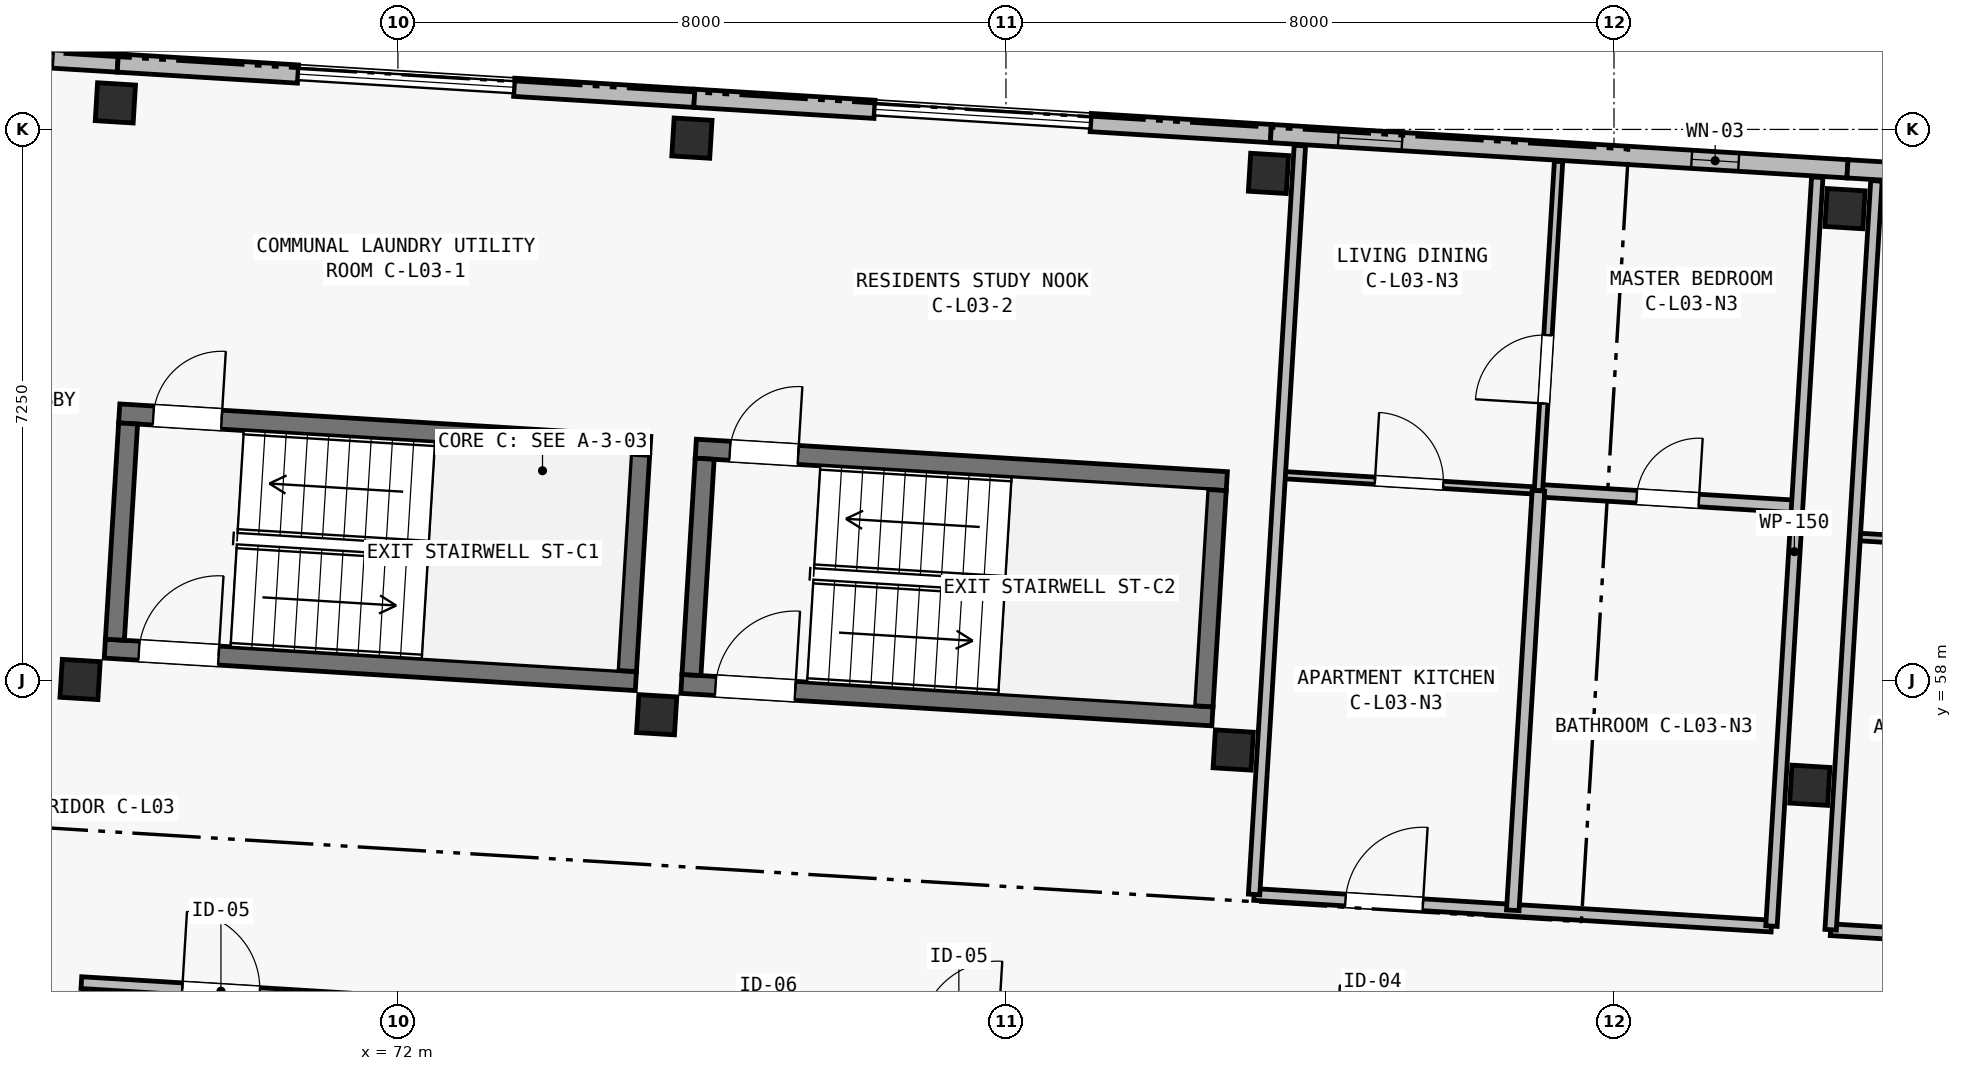
"""IFC4 building model, lengths in metres.
Left out: names, types, materials, properties, quantities, classifications, styles, units other than length and angle.
Written with IfcOpenShell. Run it as: python <this file> out.ifc"""

import sys

from ifc_helpers import new_model, si_unit, direction, frame, frame_2d, origin, origin_2d, place, context, subcontext, project, spatial, rectangle, extrude, element, fill, save


model = new_model("IFC4")
c1 = context("Model", 3, precision=1e-05, world=origin(), true_north=direction((0.0, 1.0)))
c2 = subcontext(c1, "Body", "Model", "MODEL_VIEW")
j1 = project(units=[si_unit("LENGTHUNIT", "METRE"), si_unit("PLANEANGLEUNIT", "RADIAN")], contexts=[c1])
p1 = place(None, origin())
s1 = spatial("IfcSite", under=j1, at=p1, CompositionType="ELEMENT")
p2 = place(p1, origin())
s2 = spatial("IfcBuilding", under=s1, at=p2, CompositionType="ELEMENT")
p3 = place(p2, frame((0.0, 0.0, 11.65)))
s3 = spatial("IfcBuildingStorey", under=s2, at=p3, CompositionType="ELEMENT", Elevation=11.65)
for number, where, z_axis, x_axis in (
    (1, (67.818, 58.014, 0.0), (0.0, 0.0, 1.0), (0.998, -0.061, 0.0)),
    (2, (68.282, 65.599, 0.0), (0.0, 0.0, 1.0), (0.998, -0.061, 0.0)),
    (3, (75.404, 57.55, 0.0), (0.0, 0.0, 1.0), (0.998, -0.061, 0.0)),
    (4, (75.868, 65.135, 0.0), (0.0, 0.0, 1.0), (0.998, -0.061, 0.0)),
    (5, (82.99, 57.086, 0.0), (0.0, 0.0, 1.0), (0.998, -0.061, 0.0)),
    (6, (83.454, 64.672, 0.0), (0.0, 0.0, 1.0), (0.998, -0.061, 0.0)),
    (7, (90.576, 56.622, 0.0), (0.0, 0.0, 1.0), (0.998, -0.061, 0.0)),
    (8, (91.04, 64.208, 0.0), (0.0, 0.0, 1.0), (0.998, -0.061, 0.0)),
):
    element("IfcColumn", number, at=place(p3, frame(where, z_axis=z_axis, x_axis=x_axis)), inside=s3, PredefinedType="COLUMN", context=c2, shape_type="SweptSolid", body=[
        extrude(rectangle(XDim=0.5, YDim=0.5, at=origin_2d()), origin(), (0.0, 0.0, 1.0), 3.25),
    ])
p4 = place(p3, frame((68.333, 61.514, 0.0), z_axis=(0.0, 0.0, 1.0), x_axis=(0.998135676081, -0.061034188237, 0.0)))
e9 = element("IfcWall", 9, at=p4, inside=s3, PredefinedType="SHEAR", context=c2, shape_type="SweptSolid", body=[
    extrude(rectangle(XDim=7.0, YDim=0.25, at=frame_2d((3.5, 0.0))), origin(), (0.0, 0.0, 1.0), 3.25),
])
p5 = place(p4, frame((0.45, 0.0, 0.0)))
e10 = element("IfcOpeningElement", 10, at=p5, cuts=e9, PredefinedType="OPENING", context=c2, shape_type="SweptSolid", body=[
    extrude(rectangle(XDim=0.9, YDim=2.1, at=frame_2d((0.45, 1.05))), frame((0.0, 0.14, 0.0), z_axis=(0.0, -1.0, 0.0), x_axis=(1.0, 0.0, 0.0)), (0.0, 0.0, 1.0), 0.28),
])
p6 = place(p3, frame((68.144, 58.419, 0.0), z_axis=(0.0, 0.0, 1.0), x_axis=(0.998135546153, -0.061036313012, 0.0)))
e11 = element("IfcWall", 11, at=p6, inside=s3, PredefinedType="SHEAR", context=c2, shape_type="SweptSolid", body=[
    extrude(rectangle(XDim=7.0, YDim=0.25, at=frame_2d((3.5, 0.0))), origin(), (0.0, 0.0, 1.0), 3.25),
])
p7 = place(p6, frame((0.45, 0.0, 0.0)))
e12 = element("IfcOpeningElement", 12, at=p7, cuts=e11, PredefinedType="OPENING", context=c2, shape_type="SweptSolid", body=[
    extrude(rectangle(XDim=1.05, YDim=2.15, at=frame_2d((0.525, 1.075))), frame((0.0, 0.14, 0.0), z_axis=(0.0, -1.0, 0.0), x_axis=(1.0, 0.0, 0.0)), (0.0, 0.0, 1.0), 0.28),
])
for number, where, z_axis, x_axis in (
    (13, (68.276, 58.537, 0.0), (0.0, 0.0, 1.0), (0.061, 0.998, 0.0)),
    (14, (75.014, 58.125, 0.0), (0.0, 0.0, 1.0), (0.061, 0.998, 0.0)),
):
    element("IfcWall", number, at=place(p3, frame(where, z_axis=z_axis, x_axis=x_axis)), inside=s3, PredefinedType="SHEAR", context=c2, shape_type="SweptSolid", body=[
        extrude(rectangle(XDim=2.85, YDim=0.25, at=frame_2d((1.425, 0.0))), origin(), (0.0, 0.0, 1.0), 3.25),
    ])
p8 = place(p3, frame((75.919, 61.05, 0.0), z_axis=(0.0, 0.0, 1.0), x_axis=(0.998135546153, -0.061036313012, 0.0)))
e15 = element("IfcWall", 15, at=p8, inside=s3, PredefinedType="SHEAR", context=c2, shape_type="SweptSolid", body=[
    extrude(rectangle(XDim=7.0, YDim=0.25, at=frame_2d((3.5, 0.0))), origin(), (0.0, 0.0, 1.0), 3.25),
])
p9 = place(p8, frame((0.45, 0.0, 0.0)))
e16 = element("IfcOpeningElement", 16, at=p9, cuts=e15, PredefinedType="OPENING", context=c2, shape_type="SweptSolid", body=[
    extrude(rectangle(XDim=0.9, YDim=2.1, at=frame_2d((0.45, 1.05))), frame((0.0, 0.14, 0.0), z_axis=(0.0, -1.0, 0.0), x_axis=(1.0, 0.0, 0.0)), (0.0, 0.0, 1.0), 0.28),
])
p10 = place(p3, frame((75.73, 57.956, 0.0), z_axis=(0.0, 0.0, 1.0), x_axis=(0.998135546153, -0.061036313012, 0.0)))
e17 = element("IfcWall", 17, at=p10, inside=s3, PredefinedType="SHEAR", context=c2, shape_type="SweptSolid", body=[
    extrude(rectangle(XDim=7.0, YDim=0.25, at=frame_2d((3.5, 0.0))), origin(), (0.0, 0.0, 1.0), 3.25),
])
p11 = place(p10, frame((0.45, 0.0, 0.0)))
e18 = element("IfcOpeningElement", 18, at=p11, cuts=e17, PredefinedType="OPENING", context=c2, shape_type="SweptSolid", body=[
    extrude(rectangle(XDim=1.05, YDim=2.15, at=frame_2d((0.525, 1.075))), frame((0.0, 0.14, 0.0), z_axis=(0.0, -1.0, 0.0), x_axis=(1.0, 0.0, 0.0)), (0.0, 0.0, 1.0), 0.28),
])
for number, where, z_axis, x_axis in (
    (19, (75.862, 58.073, 0.0), (0.0, 0.0, 1.0), (0.061, 0.998, 0.0)),
    (20, (82.599, 57.661, 0.0), (0.0, 0.0, 1.0), (0.061, 0.998, 0.0)),
):
    element("IfcWall", number, at=place(p3, frame(where, z_axis=z_axis, x_axis=x_axis)), inside=s3, PredefinedType="SHEAR", context=c2, shape_type="SweptSolid", body=[
        extrude(rectangle(XDim=2.85, YDim=0.25, at=frame_2d((1.425, 0.0))), origin(), (0.0, 0.0, 1.0), 3.25),
    ])
p12 = place(p3, frame((60.205, 66.62, 0.0), z_axis=(0.0, 0.0, 1.0), x_axis=(0.998134248939, -0.061057522844, 0.0)))
e21 = element("IfcWall", 21, at=p12, inside=s3, PredefinedType="SOLIDWALL", context=c2, shape_type="SweptSolid", body=[
    extrude(rectangle(XDim=8.125, YDim=0.24, at=frame_2d((4.062, 0.0))), origin(), (0.0, 0.0, 1.0), 3.0),
])
p13 = place(p12, frame((6.525, 0.0, 0.45)))
e22 = element("IfcOpeningElement", 22, at=p13, cuts=e21, PredefinedType="OPENING", context=c2, shape_type="SweptSolid", body=[
    extrude(rectangle(XDim=0.75, YDim=2.32, at=frame_2d((0.375, 1.16))), frame((0.0, 0.135, 0.0), z_axis=(0.0, -1.0, 0.0), x_axis=(1.0, 0.0, 0.0)), (0.0, 0.0, 1.0), 0.27),
])
p14 = place(p3, frame((68.314, 66.124, 0.0), z_axis=(0.0, 0.0, 1.0), x_axis=(0.998134103342, -0.061059902923, 0.0)))
e23 = element("IfcWall", 23, at=p14, inside=s3, PredefinedType="SOLIDWALL", context=c2, shape_type="SweptSolid", body=[
    extrude(rectangle(XDim=2.375, YDim=0.24, at=frame_2d((1.188, 0.0))), origin(), (0.0, 0.0, 1.0), 3.0),
])
p15 = place(p3, frame((73.53, 65.804, 0.0), z_axis=(0.0, 0.0, 1.0), x_axis=(0.998133720034, -0.061066168473, 0.0)))
e24 = element("IfcWall", 24, at=p15, inside=s3, PredefinedType="SOLIDWALL", context=c2, shape_type="SweptSolid", body=[
    extrude(rectangle(XDim=2.375, YDim=0.24, at=frame_2d((1.188, 0.0))), origin(), (0.0, 0.0, 1.0), 3.0),
])
for number, where, z_axis, x_axis in (
    (25, (75.9, 65.659, 0.0), (0.0, 0.0, 1.0), (0.998, -0.061, 0.0)),
    (26, (81.115, 65.341, 0.0), (0.0, 0.0, 1.0), (0.998, -0.061, 0.0)),
):
    element("IfcWall", number, at=place(p3, frame(where, z_axis=z_axis, x_axis=x_axis)), inside=s3, PredefinedType="SOLIDWALL", context=c2, shape_type="SweptSolid", body=[
        extrude(rectangle(XDim=2.375, YDim=0.24, at=frame_2d((1.188, 0.0))), origin(), (0.0, 0.0, 1.0), 3.0),
    ])
p16 = place(p3, frame((83.486, 65.196, 0.0), z_axis=(0.0, 0.0, 1.0), x_axis=(0.998135669243, -0.061034300063, 0.0)))
e27 = element("IfcWall", 27, at=p16, inside=s3, PredefinedType="SOLIDWALL", context=c2, shape_type="SweptSolid", body=[
    extrude(rectangle(XDim=7.6, YDim=0.24, at=frame_2d((3.8, 0.0))), origin(), (0.0, 0.0, 1.0), 3.0),
])
p17 = place(p16, frame((0.89, 0.0, 0.44)))
e28 = element("IfcOpeningElement", 28, at=p17, cuts=e27, PredefinedType="OPENING", context=c2, shape_type="SweptSolid", body=[
    extrude(rectangle(XDim=0.84, YDim=2.28, at=frame_2d((0.42, 1.14))), frame((0.0, 0.135, 0.0), z_axis=(0.0, -1.0, 0.0), x_axis=(1.0, 0.0, 0.0)), (0.0, 0.0, 1.0), 0.27),
])
p18 = place(p16, frame((5.546, 0.0, 0.5)))
e29 = element("IfcOpeningElement", 29, at=p18, cuts=e27, PredefinedType="OPENING", context=c2, shape_type="SweptSolid", body=[
    extrude(rectangle(XDim=0.62, YDim=2.28, at=frame_2d((0.31, 1.14))), frame((0.0, 0.135, 0.0), z_axis=(0.0, -1.0, 0.0), x_axis=(1.0, 0.0, 0.0)), (0.0, 0.0, 1.0), 0.27),
])
p19 = place(p3, frame((91.072, 64.732, 0.0), z_axis=(0.0, 0.0, 1.0), x_axis=(0.998133591969, -0.061068261669, 0.0)))
e30 = element("IfcWall", 30, at=p19, inside=s3, PredefinedType="SOLIDWALL", context=c2, shape_type="SweptSolid", body=[
    extrude(rectangle(XDim=7.6, YDim=0.24, at=frame_2d((3.8, 0.0))), origin(), (0.0, 0.0, 1.0), 3.0),
])
p20 = place(p19, frame((1.854, 0.0, 0.5)))
e31 = element("IfcOpeningElement", 31, at=p20, cuts=e30, PredefinedType="OPENING", context=c2, shape_type="SweptSolid", body=[
    extrude(rectangle(XDim=0.68, YDim=2.24, at=frame_2d((0.34, 1.12))), frame((0.0, 0.135, 0.0), z_axis=(0.0, -1.0, 0.0), x_axis=(1.0, 0.0, 0.0)), (0.0, 0.0, 1.0), 0.27),
])
p21 = place(p19, frame((5.018, 0.0, 0.44)))
e32 = element("IfcOpeningElement", 32, at=p21, cuts=e30, PredefinedType="OPENING", context=c2, shape_type="SweptSolid", body=[
    extrude(rectangle(XDim=0.76, YDim=2.34, at=frame_2d((0.38, 1.17))), frame((0.0, 0.135, 0.0), z_axis=(0.0, -1.0, 0.0), x_axis=(1.0, 0.0, 0.0)), (0.0, 0.0, 1.0), 0.27),
])
p22 = place(p3, frame((67.835, 54.025, 0.0), z_axis=(0.0, 0.0, 1.0), x_axis=(0.998135666539, -0.061034344288, 0.0)))
e33 = element("IfcWall", 33, at=p22, inside=s3, PredefinedType="PARTITIONING", context=c2, shape_type="SweptSolid", body=[
    extrude(rectangle(XDim=7.08, YDim=0.155, at=frame_2d((3.54, 0.0))), origin(), (0.0, 0.0, 1.0), 2.97),
])
p23 = place(p22, frame((1.33, 0.0, 0.0)))
e34 = element("IfcOpeningElement", 34, at=p23, cuts=e33, PredefinedType="OPENING", context=c2, shape_type="SweptSolid", body=[
    extrude(rectangle(XDim=1.02, YDim=2.2, at=frame_2d((0.51, 1.1))), frame((0.0, 0.093, 0.0), z_axis=(0.0, -1.0, 0.0), x_axis=(1.0, 0.0, 0.0)), (0.0, 0.0, 1.0), 0.185),
])
p24 = place(p3, frame((83.265, 55.185, 0.0), z_axis=(0.0, 0.0, 1.0), x_axis=(0.998135531673, -0.061036549799, 0.0)))
e35 = element("IfcWall", 35, at=p24, inside=s3, PredefinedType="PARTITIONING", context=c2, shape_type="SweptSolid", body=[
    extrude(rectangle(XDim=6.82, YDim=0.155, at=frame_2d((3.41, 0.0))), origin(), (0.0, 0.0, 1.0), 2.97),
])
p25 = place(p24, frame((1.205, 0.0, 0.0)))
e36 = element("IfcOpeningElement", 36, at=p25, cuts=e35, PredefinedType="OPENING", context=c2, shape_type="SweptSolid", body=[
    extrude(rectangle(XDim=1.02, YDim=2.2, at=frame_2d((0.51, 1.1))), frame((0.0, 0.093, 0.0), z_axis=(0.0, -1.0, 0.0), x_axis=(1.0, 0.0, 0.0)), (0.0, 0.0, 1.0), 0.185),
])
p26 = place(p3, frame((83.602, 60.705, 0.0), z_axis=(0.0, 0.0, 1.0), x_axis=(0.998133617109, -0.061067850767, 0.0)))
e37 = element("IfcWall", 37, at=p26, inside=s3, PredefinedType="PARTITIONING", context=c2, shape_type="SweptSolid", body=[
    extrude(rectangle(XDim=3.41, YDim=0.095, at=frame_2d((1.705, 0.0))), origin(), (0.0, 0.0, 1.0), 2.97),
])
p27 = place(p26, frame((1.255, 0.0, 0.0)))
e38 = element("IfcOpeningElement", 38, at=p27, cuts=e37, PredefinedType="OPENING", context=c2, shape_type="SweptSolid", body=[
    extrude(rectangle(XDim=0.9, YDim=2.1, at=frame_2d((0.45, 1.05))), frame((0.0, 0.062, 0.0), z_axis=(0.0, -1.0, 0.0), x_axis=(1.0, 0.0, 0.0)), (0.0, 0.0, 1.0), 0.125),
])
p28 = place(p3, frame((87.006, 60.497, 0.0), z_axis=(0.0, 0.0, 1.0), x_axis=(0.998137711988, -0.061000884486, 0.0)))
e39 = element("IfcWall", 39, at=p28, inside=s3, PredefinedType="PLUMBINGWALL", context=c2, shape_type="SweptSolid", body=[
    extrude(rectangle(XDim=3.41, YDim=0.165, at=frame_2d((1.705, 0.0))), origin(), (0.0, 0.0, 1.0), 2.97),
])
p29 = place(p28, frame((1.295, 0.0, 0.0)))
e40 = element("IfcOpeningElement", 40, at=p29, cuts=e39, PredefinedType="OPENING", context=c2, shape_type="SweptSolid", body=[
    extrude(rectangle(XDim=0.82, YDim=2.08, at=frame_2d((0.41, 1.04))), frame((0.0, 0.097, 0.0), z_axis=(0.0, -1.0, 0.0), x_axis=(1.0, 0.0, 0.0)), (0.0, 0.0, 1.0), 0.195),
])
p30 = place(p3, frame((87.006, 60.497, 0.0), z_axis=(0.0, 0.0, 1.0), x_axis=(0.06103343432, 0.998135722182, 0.0)))
e41 = element("IfcWall", 41, at=p30, inside=s3, PredefinedType="PARTITIONING", context=c2, shape_type="SweptSolid", body=[
    extrude(rectangle(XDim=4.34, YDim=0.11, at=frame_2d((2.17, 0.0))), origin(), (0.0, 0.0, 1.0), 2.97),
])
p31 = place(p30, frame((1.15, 0.0, 0.0)))
e42 = element("IfcOpeningElement", 42, at=p31, cuts=e41, PredefinedType="OPENING", context=c2, shape_type="SweptSolid", body=[
    extrude(rectangle(XDim=0.9, YDim=2.1, at=frame_2d((0.45, 1.05))), frame((0.0, 0.07, 0.0), z_axis=(0.0, -1.0, 0.0), x_axis=(1.0, 0.0, 0.0)), (0.0, 0.0, 1.0), 0.14),
])
p32 = place(p3, frame((86.668, 54.977, 0.0), z_axis=(0.0, 0.0, 1.0), x_axis=(0.061058897293, 0.99813416486, 0.0)))
e43 = element("IfcWall", 43, at=p32, inside=s3, PredefinedType="PLUMBINGWALL", context=c2, shape_type="SweptSolid", body=[
    extrude(rectangle(XDim=5.53, YDim=0.165, at=frame_2d((2.765, 0.0))), origin(), (0.0, 0.0, 1.0), 2.97),
])
p33 = place(p3, frame((83.265, 55.185, 0.0), z_axis=(0.0, 0.0, 1.0), x_axis=(0.061046193261, 0.998134941923, 0.0)))
e44 = element("IfcWall", 44, at=p33, inside=s3, PredefinedType="PARTITIONING", context=c2, shape_type="SweptSolid", body=[
    extrude(rectangle(XDim=9.87, YDim=0.15, at=frame_2d((4.935, 0.0))), origin(), (0.0, 0.0, 1.0), 2.97),
])
p34 = place(p3, frame((90.072, 54.769, 0.0), z_axis=(0.0, 0.0, 1.0), x_axis=(0.061047700465, 0.998134849741, 0.0)))
e45 = element("IfcWall", 45, at=p34, inside=s3, PredefinedType="PARTITIONING", context=c2, shape_type="SweptSolid", body=[
    extrude(rectangle(XDim=9.87, YDim=0.15, at=frame_2d((4.935, 0.0))), origin(), (0.0, 0.0, 1.0), 2.97),
])
p35 = place(p3, frame((90.85, 54.721, 0.0), z_axis=(0.0, 0.0, 1.0), x_axis=(0.998135665032, -0.06103436893, 0.0)))
e46 = element("IfcWall", 46, at=p35, inside=s3, PredefinedType="PARTITIONING", context=c2, shape_type="SweptSolid", body=[
    extrude(rectangle(XDim=6.82, YDim=0.155, at=frame_2d((3.41, 0.0))), origin(), (0.0, 0.0, 1.0), 2.97),
])
p36 = place(p35, frame((1.205, 0.0, 0.0)))
e47 = element("IfcOpeningElement", 47, at=p36, cuts=e46, PredefinedType="OPENING", context=c2, shape_type="SweptSolid", body=[
    extrude(rectangle(XDim=0.98, YDim=2.15, at=frame_2d((0.49, 1.075))), frame((0.0, 0.093, 0.0), z_axis=(0.0, -1.0, 0.0), x_axis=(1.0, 0.0, 0.0)), (0.0, 0.0, 1.0), 0.185),
])
p37 = place(p3, frame((91.167, 59.892, 0.0), z_axis=(0.0, 0.0, 1.0), x_axis=(0.998133617109, -0.061067850767, 0.0)))
e48 = element("IfcWall", 48, at=p37, inside=s3, PredefinedType="PARTITIONING", context=c2, shape_type="SweptSolid", body=[
    extrude(rectangle(XDim=3.41, YDim=0.1, at=frame_2d((1.705, 0.0))), origin(), (0.0, 0.0, 1.0), 2.97),
])
p38 = place(p37, frame((1.255, 0.0, 0.0)))
e49 = element("IfcOpeningElement", 49, at=p38, cuts=e48, PredefinedType="OPENING", context=c2, shape_type="SweptSolid", body=[
    extrude(rectangle(XDim=0.88, YDim=2.1, at=frame_2d((0.44, 1.05))), frame((0.0, 0.065, 0.0), z_axis=(0.0, -1.0, 0.0), x_axis=(1.0, 0.0, 0.0)), (0.0, 0.0, 1.0), 0.13),
])
p39 = place(p3, frame((90.85, 54.721, 0.0), z_axis=(0.0, 0.0, 1.0), x_axis=(0.061047700465, 0.998134849741, 0.0)))
e50 = element("IfcWall", 50, at=p39, inside=s3, PredefinedType="PARTITIONING", context=c2, shape_type="SweptSolid", body=[
    extrude(rectangle(XDim=9.87, YDim=0.15, at=frame_2d((4.935, 0.0))), origin(), (0.0, 0.0, 1.0), 2.97),
])
p40 = place(p13, origin())
e51 = element("IfcWindow", 51, at=p40, inside=s3, PartitioningType="SINGLE_PANEL", PredefinedType="WINDOW", context=c2, shape_type="SweptSolid", body=[
    extrude(rectangle(XDim=0.75, YDim=2.32, at=frame_2d((0.375, 1.16))), frame((0.0, 0.03, 0.0), z_axis=(0.0, -1.0, 0.0), x_axis=(1.0, 0.0, 0.0)), (0.0, 0.0, 1.0), 0.06),
])
fill(e22, e51)
p41 = place(p17, origin())
e52 = element("IfcWindow", 52, at=p41, inside=s3, PartitioningType="SINGLE_PANEL", PredefinedType="WINDOW", context=c2, shape_type="SweptSolid", body=[
    extrude(rectangle(XDim=0.84, YDim=2.28, at=frame_2d((0.42, 1.14))), frame((0.0, 0.03, 0.0), z_axis=(0.0, -1.0, 0.0), x_axis=(1.0, 0.0, 0.0)), (0.0, 0.0, 1.0), 0.06),
])
fill(e28, e52)
p42 = place(p18, origin())
e53 = element("IfcWindow", 53, at=p42, inside=s3, PartitioningType="SINGLE_PANEL", PredefinedType="WINDOW", context=c2, shape_type="SweptSolid", body=[
    extrude(rectangle(XDim=0.62, YDim=2.28, at=frame_2d((0.31, 1.14))), frame((0.0, 0.03, 0.0), z_axis=(0.0, -1.0, 0.0), x_axis=(1.0, 0.0, 0.0)), (0.0, 0.0, 1.0), 0.06),
])
fill(e29, e53)
p43 = place(p23, origin())
e54 = element("IfcDoor", 54, at=p43, inside=s3, OperationType="SINGLE_SWING_LEFT", PredefinedType="DOOR", context=c2, shape_type="SweptSolid", body=[
    extrude(rectangle(XDim=1.02, YDim=2.2, at=frame_2d((0.51, 1.1))), frame((0.0, 0.025, 0.0), z_axis=(0.0, -1.0, 0.0), x_axis=(1.0, 0.0, 0.0)), (0.0, 0.0, 1.0), 0.05),
])
fill(e34, e54)
p44 = place(p25, origin())
e55 = element("IfcDoor", 55, at=p44, inside=s3, OperationType="SINGLE_SWING_RIGHT", PredefinedType="DOOR", context=c2, shape_type="SweptSolid", body=[
    extrude(rectangle(XDim=1.02, YDim=2.2, at=frame_2d((0.51, 1.1))), frame((0.0, 0.025, 0.0), z_axis=(0.0, -1.0, 0.0), x_axis=(1.0, 0.0, 0.0)), (0.0, 0.0, 1.0), 0.05),
])
fill(e36, e55)
p45 = place(p27, origin())
e56 = element("IfcDoor", 56, at=p45, inside=s3, OperationType="SINGLE_SWING_LEFT", PredefinedType="DOOR", context=c2, shape_type="SweptSolid", body=[
    extrude(rectangle(XDim=0.9, YDim=2.1, at=frame_2d((0.45, 1.05))), frame((0.0, 0.025, 0.0), z_axis=(0.0, -1.0, 0.0), x_axis=(1.0, 0.0, 0.0)), (0.0, 0.0, 1.0), 0.05),
])
fill(e38, e56)
p46 = place(p29, origin())
e57 = element("IfcDoor", 57, at=p46, inside=s3, OperationType="SINGLE_SWING_RIGHT", PredefinedType="DOOR", context=c2, shape_type="SweptSolid", body=[
    extrude(rectangle(XDim=0.82, YDim=2.08, at=frame_2d((0.41, 1.04))), frame((0.0, 0.025, 0.0), z_axis=(0.0, -1.0, 0.0), x_axis=(1.0, 0.0, 0.0)), (0.0, 0.0, 1.0), 0.05),
])
fill(e40, e57)
p47 = place(p31, origin())
e58 = element("IfcDoor", 58, at=p47, inside=s3, OperationType="SINGLE_SWING_LEFT", PredefinedType="DOOR", context=c2, shape_type="SweptSolid", body=[
    extrude(rectangle(XDim=0.9, YDim=2.1, at=frame_2d((0.45, 1.05))), frame((0.0, 0.025, 0.0), z_axis=(0.0, -1.0, 0.0), x_axis=(1.0, 0.0, 0.0)), (0.0, 0.0, 1.0), 0.05),
])
fill(e42, e58)
p48 = place(p7, origin())
e59 = element("IfcDoor", 59, at=p48, inside=s3, OperationType="SINGLE_SWING_RIGHT", PredefinedType="DOOR", context=c2, shape_type="SweptSolid", body=[
    extrude(rectangle(XDim=1.05, YDim=2.15, at=frame_2d((0.525, 1.075))), frame((0.0, 0.025, 0.0), z_axis=(0.0, -1.0, 0.0), x_axis=(1.0, 0.0, 0.0)), (0.0, 0.0, 1.0), 0.05),
])
fill(e12, e59)
p49 = place(p5, origin())
e60 = element("IfcDoor", 60, at=p49, inside=s3, OperationType="SINGLE_SWING_RIGHT", PredefinedType="DOOR", context=c2, shape_type="SweptSolid", body=[
    extrude(rectangle(XDim=0.9, YDim=2.1, at=frame_2d((0.45, 1.05))), frame((0.0, 0.025, 0.0), z_axis=(0.0, -1.0, 0.0), x_axis=(1.0, 0.0, 0.0)), (0.0, 0.0, 1.0), 0.05),
])
fill(e10, e60)
p50 = place(p11, origin())
e61 = element("IfcDoor", 61, at=p50, inside=s3, OperationType="SINGLE_SWING_RIGHT", PredefinedType="DOOR", context=c2, shape_type="SweptSolid", body=[
    extrude(rectangle(XDim=1.05, YDim=2.15, at=frame_2d((0.525, 1.075))), frame((0.0, 0.025, 0.0), z_axis=(0.0, -1.0, 0.0), x_axis=(1.0, 0.0, 0.0)), (0.0, 0.0, 1.0), 0.05),
])
fill(e18, e61)
p51 = place(p9, origin())
e62 = element("IfcDoor", 62, at=p51, inside=s3, OperationType="SINGLE_SWING_RIGHT", PredefinedType="DOOR", context=c2, shape_type="SweptSolid", body=[
    extrude(rectangle(XDim=0.9, YDim=2.1, at=frame_2d((0.45, 1.05))), frame((0.0, 0.025, 0.0), z_axis=(0.0, -1.0, 0.0), x_axis=(1.0, 0.0, 0.0)), (0.0, 0.0, 1.0), 0.05),
])
fill(e16, e62)
save(model, sys.argv[1])
